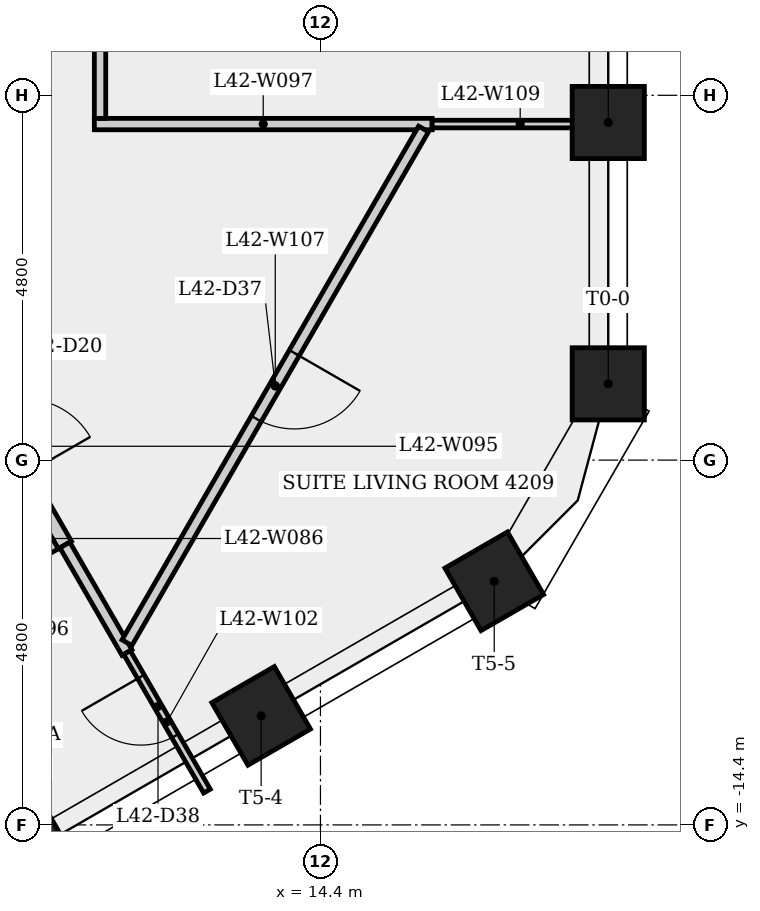
"""IFC4 building model, lengths in metres.
Left out: names, types, materials, properties, quantities, classifications, styles, units other than length and angle.
Written with IfcOpenShell. Run it as: python <this file> out.ifc"""

import sys

from ifc_helpers import new_model, si_unit, direction, frame, frame_2d, origin, origin_2d, place, context, subcontext, project, spatial, rectangle, extrude, element, fill, save


model = new_model("IFC4")
c1 = context("Model", 3, precision=1e-05, world=origin(), true_north=direction((0.0, 1.0)))
c2 = subcontext(c1, "Body", "Model", "MODEL_VIEW")
j1 = project(units=[si_unit("LENGTHUNIT", "METRE"), si_unit("PLANEANGLEUNIT", "RADIAN")], contexts=[c1])
p1 = place(None, origin())
s1 = spatial("IfcSite", under=j1, at=p1, CompositionType="ELEMENT")
p2 = place(p1, origin())
s2 = spatial("IfcBuilding", under=s1, at=p2, CompositionType="ELEMENT")
p3 = place(p2, frame((0.0, 0.0, 159.5)))
s3 = spatial("IfcBuildingStorey", under=s2, at=p3, CompositionType="ELEMENT", Elevation=159.5)
for number, where, z_axis, x_axis in (
    (1, (18.187, -8.597, 0.0), (0.0, 0.0, 1.0), (1.0, 0.0, 0.0)),
    (2, (18.187, -5.158, 0.0), (0.0, 0.0, 1.0), (1.0, 0.0, 0.0)),
    (3, (10.552, -14.736, 0.0), (0.0, 0.0, 1.0), (0.5, -0.866, 0.0)),
    (4, (13.62, -12.965, 0.0), (0.0, 0.0, 1.0), (0.5, -0.866, 0.0)),
    (5, (16.687, -11.195, 0.0), (0.0, 0.0, 1.0), (0.5, -0.866, 0.0)),
):
    element("IfcColumn", number, at=place(p3, frame(where, z_axis=z_axis, x_axis=x_axis)), inside=s3, PredefinedType="COLUMN", context=c2, shape_type="SweptSolid", body=[
        extrude(rectangle(XDim=0.95, YDim=0.95, at=origin_2d()), origin(), (0.0, 0.0, 1.0), 3.4),
    ])
p4 = place(p3, frame((9.537, -8.119, 0.0), z_axis=(0.0, 0.0, 1.0), x_axis=(0.499990139034, -0.866031096941, 0.0)))
e6 = element("IfcWall", 6, at=p4, inside=s3, PredefinedType="PARTITIONING", context=c2, shape_type="SweptSolid", body=[
    extrude(rectangle(XDim=3.0, YDim=0.2, at=frame_2d((1.5, 0.0))), origin(), (0.0, 0.0, 1.0), 3.05),
])
p5 = place(p4, frame((0.935, 0.0, 0.0)))
e7 = element("IfcOpeningElement", 7, at=p5, cuts=e6, PredefinedType="OPENING", context=c2, shape_type="SweptSolid", body=[
    extrude(rectangle(XDim=1.0, YDim=2.1, at=frame_2d((0.5, 1.05))), frame((0.0, 0.11, 0.0), z_axis=(0.0, -1.0, 0.0), x_axis=(1.0, 0.0, 0.0)), (0.0, 0.0, 1.0), 0.22),
])
p6 = place(p3, frame((10.901, -10.681, 0.0), z_axis=(0.0, 0.0, 1.0), x_axis=(-0.866007538022, -0.500030943131, 0.0)))
e8 = element("IfcWall", 8, at=p6, inside=s3, PredefinedType="PARTITIONING", context=c2, shape_type="SweptSolid", body=[
    extrude(rectangle(XDim=2.375, YDim=0.2, at=frame_2d((1.188, 0.0))), origin(), (0.0, 0.0, 1.0), 3.05),
])
p7 = place(p3, frame((11.425, -5.178, 0.0), z_axis=(0.0, 0.0, 1.0), x_axis=(1.0, 0.0, 0.0)))
e9 = element("IfcWall", 9, at=p7, inside=s3, PredefinedType="PARTITIONING", context=c2, shape_type="SweptSolid", body=[
    extrude(rectangle(XDim=4.444, YDim=0.15, at=frame_2d((2.222, 0.0))), origin(), (0.0, 0.0, 1.0), 3.05),
])
p8 = place(p3, frame((11.5, -5.104, 0.0), z_axis=(0.0, 0.0, 1.0), x_axis=(0.0, 1.0, 0.0)))
e10 = element("IfcWall", 10, at=p8, inside=s3, PredefinedType="PARTITIONING", context=c2, shape_type="SweptSolid", body=[
    extrude(rectangle(XDim=10.357, YDim=0.15, at=frame_2d((5.178, 0.0))), origin(), (0.0, 0.0, 1.0), 3.05),
])
p9 = place(p8, frame((2.451, 0.0, 0.0)))
e11 = element("IfcOpeningElement", 11, at=p9, cuts=e10, PredefinedType="OPENING", context=c2, shape_type="SweptSolid", body=[
    extrude(rectangle(XDim=1.0, YDim=2.1, at=frame_2d((0.5, 1.05))), frame((0.0, 0.085, 0.0), z_axis=(0.0, -1.0, 0.0), x_axis=(1.0, 0.0, 0.0)), (0.0, 0.0, 1.0), 0.17),
])
p10 = place(p8, frame((8.041, 0.0, 0.0)))
e12 = element("IfcOpeningElement", 12, at=p10, cuts=e10, PredefinedType="OPENING", context=c2, shape_type="SweptSolid", body=[
    extrude(rectangle(XDim=1.0, YDim=2.1, at=frame_2d((0.5, 1.05))), frame((0.0, 0.085, 0.0), z_axis=(0.0, -1.0, 0.0), x_axis=(1.0, 0.0, 0.0)), (0.0, 0.0, 1.0), 0.17),
])
p11 = place(p3, frame((11.854, -12.132, 0.0), z_axis=(0.0, 0.0, 1.0), x_axis=(-0.499899205091, 0.866083589932, 0.0)))
e13 = element("IfcWall", 13, at=p11, inside=s3, PredefinedType="PARTITIONING", context=c2, shape_type="SweptSolid", body=[
    extrude(rectangle(XDim=1.634, YDim=0.15, at=frame_2d((0.817, 0.0))), origin(), (0.0, 0.0, 1.0), 3.05),
])
p12 = place(p3, frame((12.907, -13.955, 0.0), z_axis=(0.0, 0.0, 1.0), x_axis=(-0.50004374799, 0.866000144397, 0.0)))
e14 = element("IfcWall", 14, at=p12, inside=s3, PredefinedType="PARTITIONING", context=c2, shape_type="SweptSolid", body=[
    extrude(rectangle(XDim=2.105, YDim=0.1, at=frame_2d((1.052, 0.0))), origin(), (0.0, 0.0, 1.0), 3.05),
])
p13 = place(p12, frame((0.838, 0.0, 0.0)))
e15 = element("IfcOpeningElement", 15, at=p13, cuts=e14, PredefinedType="OPENING", context=c2, shape_type="SweptSolid", body=[
    extrude(rectangle(XDim=0.9, YDim=2.1, at=frame_2d((0.45, 1.05))), frame((0.0, 0.06, 0.0), z_axis=(0.0, -1.0, 0.0), x_axis=(1.0, 0.0, 0.0)), (0.0, 0.0, 1.0), 0.12),
])
p14 = place(p3, frame((15.757, -5.243, 0.0), z_axis=(0.0, 0.0, 1.0), x_axis=(-0.500001355988, -0.866024620903, 0.0)))
e16 = element("IfcWall", 16, at=p14, inside=s3, PredefinedType="PARTITIONING", context=c2, shape_type="SweptSolid", body=[
    extrude(rectangle(XDim=7.805, YDim=0.15, at=frame_2d((3.902, 0.0))), origin(), (0.0, 0.0, 1.0), 3.05),
])
p15 = place(p14, frame((3.402, 0.0, 0.0)))
e17 = element("IfcOpeningElement", 17, at=p15, cuts=e16, PredefinedType="OPENING", context=c2, shape_type="SweptSolid", body=[
    extrude(rectangle(XDim=1.0, YDim=2.1, at=frame_2d((0.5, 1.05))), frame((0.0, 0.085, 0.0), z_axis=(0.0, -1.0, 0.0), x_axis=(1.0, 0.0, 0.0)), (0.0, 0.0, 1.0), 0.17),
])
p16 = place(p3, frame((18.187, -5.178, 0.0), z_axis=(0.0, 0.0, 1.0), x_axis=(-1.0, 0.0, 0.0)))
e18 = element("IfcWall", 18, at=p16, inside=s3, PredefinedType="PARTITIONING", context=c2, shape_type="SweptSolid", body=[
    extrude(rectangle(XDim=2.317, YDim=0.1, at=frame_2d((1.159, 0.0))), origin(), (0.0, 0.0, 1.0), 3.05),
])
p17 = place(p15, origin())
e19 = element("IfcDoor", 19, at=p17, inside=s3, OperationType="SINGLE_SWING_LEFT", PredefinedType="DOOR", context=c2, shape_type="SweptSolid", body=[
    extrude(rectangle(XDim=1.0, YDim=2.1, at=frame_2d((0.5, 1.05))), frame((0.0, 0.025, 0.0), z_axis=(0.0, -1.0, 0.0), x_axis=(1.0, 0.0, 0.0)), (0.0, 0.0, 1.0), 0.05),
])
fill(e17, e19)
p18 = place(p13, origin())
e20 = element("IfcDoor", 20, at=p18, inside=s3, OperationType="SINGLE_SWING_RIGHT", PredefinedType="DOOR", context=c2, shape_type="SweptSolid", body=[
    extrude(rectangle(XDim=0.9, YDim=2.1, at=frame_2d((0.45, 1.05))), frame((0.0, 0.025, 0.0), z_axis=(0.0, -1.0, 0.0), x_axis=(1.0, 0.0, 0.0)), (0.0, 0.0, 1.0), 0.05),
])
fill(e15, e20)
save(model, sys.argv[1])
